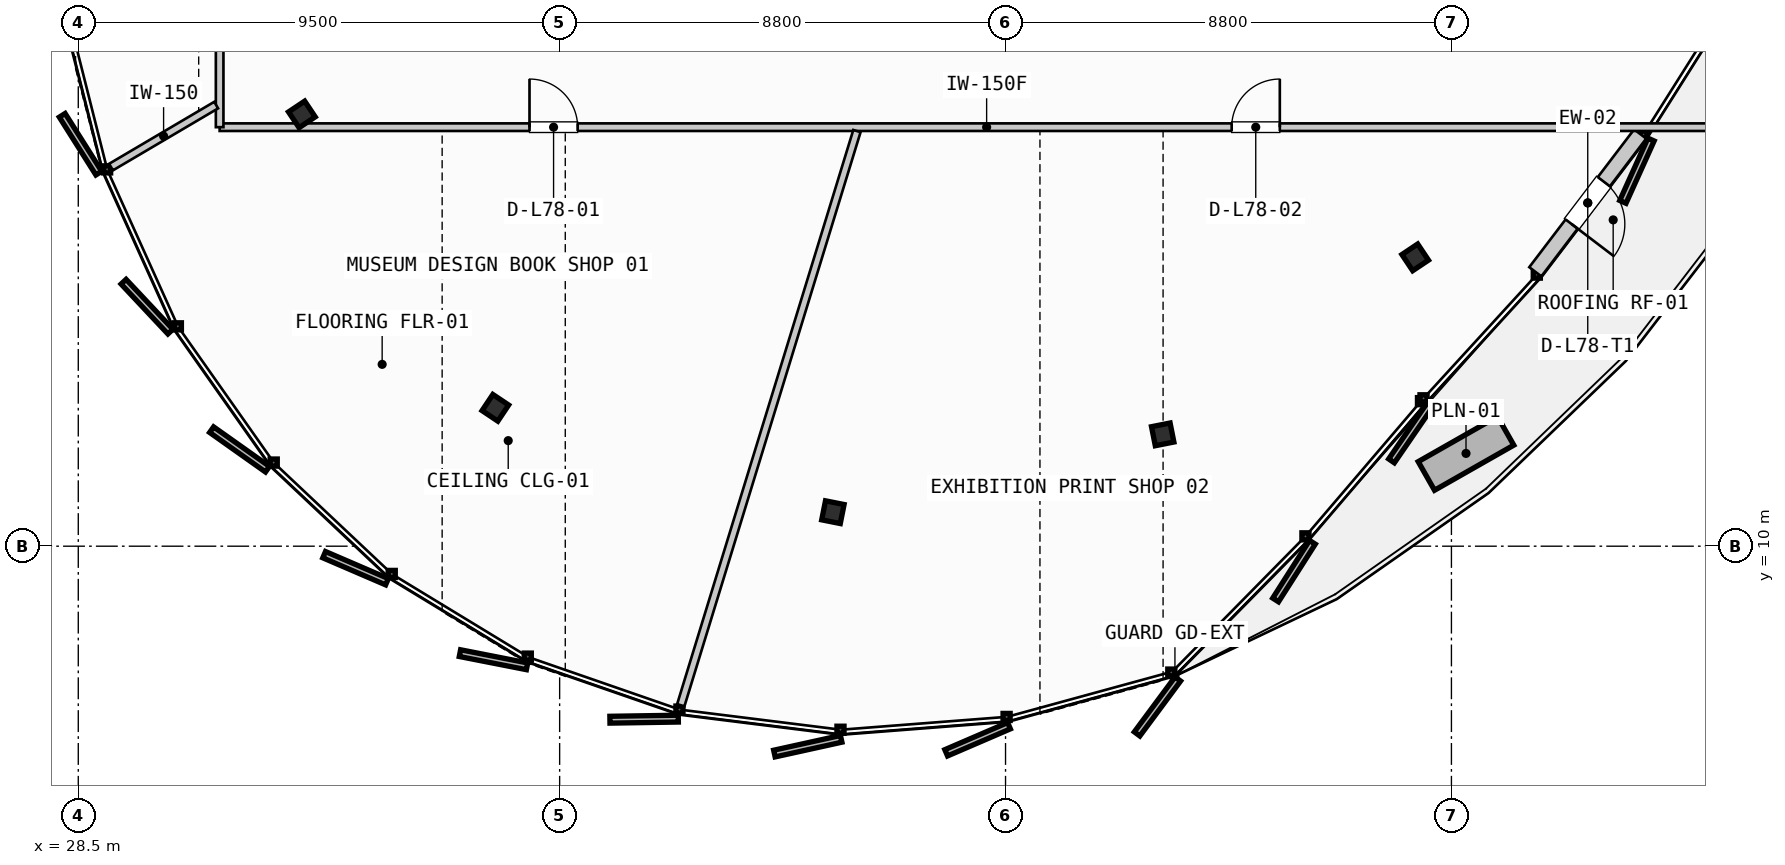
"""IFC4 building model, lengths in metres.
Left out: names, types, materials, properties, quantities, classifications, styles, units other than length and angle.
Written with IfcOpenShell. Run it as: python <this file> out.ifc"""

import sys

from ifc_helpers import new_model, si_unit, direction, frame, frame_2d, origin, origin_2d, place, context, subcontext, project, spatial, rectangle, i_section, extrude, source, transform, mapped, element, fill, save


model = new_model("IFC4")
c1 = context("Model", 3, precision=1e-05, world=origin(), true_north=direction((0.0, 1.0)))
c2 = subcontext(c1, "Body", "Model", "MODEL_VIEW")
j1 = project(units=[si_unit("LENGTHUNIT", "METRE"), si_unit("PLANEANGLEUNIT", "RADIAN")], contexts=[c1])
p1 = place(None, origin())
s1 = spatial("IfcSite", under=j1, at=p1, CompositionType="ELEMENT")
p2 = place(p1, origin())
s2 = spatial("IfcBuilding", under=s1, at=p2, CompositionType="ELEMENT")
p3 = place(p2, frame((0.0, 0.0, 293.95)))
s3 = spatial("IfcBuildingStorey", under=s2, at=p3, CompositionType="ELEMENT", Elevation=293.95)
m1 = source(origin(), c2, "Body", "SweptSolid", [
    extrude(i_section(OverallWidth=0.374, OverallDepth=0.383, WebThickness=0.017, FlangeThickness=0.026, FilletRadius=0.015, at=origin_2d()), origin(), (0.0, 0.0, 1.0), 3.21),
])
for number, where, z_axis, x_axis in (
    (1, (32.913, 18.521, 0.0), (0.0, 0.0, 1.0), (-0.831, -0.556, 0.0)),
    (2, (36.731, 12.731, 0.0), (0.0, 0.0, 1.0), (-0.556, -0.831, 0.0)),
    (3, (43.393, 10.671, 0.0), (0.0, 0.0, 1.0), (-0.195, -0.981, 0.0)),
    (4, (49.902, 12.207, 0.0), (0.0, 0.0, 1.0), (0.195, -0.981, 0.0)),
    (5, (54.885, 15.7, 0.0), (0.0, 0.0, 1.0), (0.556, -0.831, 0.0)),
):
    element("IfcColumn", number, at=place(p3, frame(where, z_axis=z_axis, x_axis=x_axis)), inside=s3, PredefinedType="COLUMN", context=c2, shape_type="MappedRepresentation", body=[
        mapped(m1, transform((0.0, 0.0, 0.0), scale=1.0)),
    ])
p4 = place(p3, frame((59.325, 18.135, 0.0), z_axis=(0.0, 0.0, 1.0), x_axis=(-0.605586755282, -0.795779292158, 0.0)))
e6 = element("IfcWall", 6, at=p4, inside=s3, PredefinedType="SOLIDWALL", context=c2, shape_type="SweptSolid", body=[
    extrude(rectangle(XDim=3.417, YDim=0.3, at=frame_2d((1.708, 0.0))), origin(), (0.0, 0.0, 1.0), 2.735),
])
p5 = place(p4, frame((1.184, 0.0, 0.0)))
e7 = element("IfcOpeningElement", 7, at=p5, cuts=e6, PredefinedType="OPENING", context=c2, shape_type="SweptSolid", body=[
    extrude(rectangle(XDim=1.05, YDim=2.2, at=frame_2d((0.525, 1.1))), frame((0.0, 0.16, 0.0), z_axis=(0.0, -1.0, 0.0), x_axis=(1.0, 0.0, 0.0)), (0.0, 0.0, 1.0), 0.32),
])
p6 = place(p3, frame((31.29, 18.269, 0.0), z_axis=(0.0, 0.0, 1.0), x_axis=(1.0, 0.0, 0.0)))
e8 = element("IfcWall", 8, at=p6, inside=s3, PredefinedType="PARTITIONING", context=c2, shape_type="SweptSolid", body=[
    extrude(rectangle(XDim=30.274, YDim=0.15, at=frame_2d((15.137, 0.0))), origin(), (0.0, 0.0, 1.0), 2.315),
])
p7 = place(p6, frame((6.115, 0.0, 0.0)))
e9 = element("IfcOpeningElement", 9, at=p7, cuts=e8, PredefinedType="OPENING", context=c2, shape_type="SweptSolid", body=[
    extrude(rectangle(XDim=0.95, YDim=2.15, at=frame_2d((0.475, 1.075))), frame((0.0, 0.085, 0.0), z_axis=(0.0, -1.0, 0.0), x_axis=(1.0, 0.0, 0.0)), (0.0, 0.0, 1.0), 0.17),
])
p8 = place(p6, frame((19.973, 0.0, 0.0)))
e10 = element("IfcOpeningElement", 10, at=p8, cuts=e8, PredefinedType="OPENING", context=c2, shape_type="SweptSolid", body=[
    extrude(rectangle(XDim=0.95, YDim=2.15, at=frame_2d((0.475, 1.075))), frame((0.0, 0.085, 0.0), z_axis=(0.0, -1.0, 0.0), x_axis=(1.0, 0.0, 0.0)), (0.0, 0.0, 1.0), 0.17),
])
p9 = place(p3, frame((31.29, 37.562, 0.0), z_axis=(0.0, 0.0, 1.0), x_axis=(0.0, -1.0, 0.0)))
e11 = element("IfcWall", 11, at=p9, inside=s3, PredefinedType="PARTITIONING", context=c2, shape_type="SweptSolid", body=[
    extrude(rectangle(XDim=19.293, YDim=0.15, at=frame_2d((9.646, 0.0))), origin(), (0.0, 0.0, 1.0), 2.315),
])
p10 = place(p9, frame((4.525, 0.0, 0.0)))
e12 = element("IfcOpeningElement", 12, at=p10, cuts=e11, PredefinedType="OPENING", context=c2, shape_type="SweptSolid", body=[
    extrude(rectangle(XDim=0.95, YDim=2.15, at=frame_2d((0.475, 1.075))), frame((0.0, 0.085, 0.0), z_axis=(0.0, -1.0, 0.0), x_axis=(1.0, 0.0, 0.0)), (0.0, 0.0, 1.0), 0.17),
])
p11 = place(p9, frame((13.992, 0.0, 0.0)))
e13 = element("IfcOpeningElement", 13, at=p11, cuts=e11, PredefinedType="OPENING", context=c2, shape_type="SweptSolid", body=[
    extrude(rectangle(XDim=0.95, YDim=2.15, at=frame_2d((0.475, 1.075))), frame((0.0, 0.085, 0.0), z_axis=(0.0, -1.0, 0.0), x_axis=(1.0, 0.0, 0.0)), (0.0, 0.0, 1.0), 0.17),
])
p12 = place(p3, frame((31.221, 18.704, 0.0), z_axis=(0.0, 0.0, 1.0), x_axis=(-0.861571718846, -0.507635866823, 0.0)))
e14 = element("IfcWall", 14, at=p12, inside=s3, PredefinedType="PARTITIONING", context=c2, shape_type="SweptSolid", body=[
    extrude(rectangle(XDim=2.408, YDim=0.15, at=frame_2d((1.204, 0.0))), origin(), (0.0, 0.0, 1.0), 2.315),
])
p13 = place(p3, frame((43.867, 18.192, 0.0), z_axis=(0.0, 0.0, 1.0), x_axis=(-0.293314223646, -0.956016090977, 0.0)))
e15 = element("IfcWall", 15, at=p13, inside=s3, PredefinedType="PARTITIONING", context=c2, shape_type="SweptSolid", body=[
    extrude(rectangle(XDim=11.852, YDim=0.15, at=frame_2d((5.926, 0.0))), origin(), (0.0, 0.0, 1.0), 2.315),
])
m2 = source(origin(), c2, "Body", "SweptSolid", [
    extrude(rectangle(XDim=1.05, YDim=2.2, at=frame_2d((0.525, 1.1))), frame((0.0, 0.025, 0.0), z_axis=(0.0, -1.0, 0.0), x_axis=(1.0, 0.0, 0.0)), (0.0, 0.0, 1.0), 0.05),
])
p14 = place(p5, origin())
e16 = element("IfcDoor", 16, at=p14, inside=s3, OperationType="SINGLE_SWING_RIGHT", PredefinedType="DOOR", context=c2, shape_type="MappedRepresentation", body=[
    mapped(m2, transform((0.0, 0.0, 0.0), scale=1.0)),
])
fill(e7, e16)
m3 = source(origin(), c2, "Body", "SweptSolid", [
    extrude(rectangle(XDim=0.95, YDim=2.15, at=frame_2d((0.475, 1.075))), frame((0.0, 0.025, 0.0), z_axis=(0.0, -1.0, 0.0), x_axis=(1.0, 0.0, 0.0)), (0.0, 0.0, 1.0), 0.05),
])
p15 = place(p7, origin())
e17 = element("IfcDoor", 17, at=p15, inside=s3, OperationType="SINGLE_SWING_LEFT", PredefinedType="DOOR", context=c2, shape_type="MappedRepresentation", body=[
    mapped(m3, transform((0.0, 0.0, 0.0), scale=1.0)),
])
fill(e9, e17)
p16 = place(p8, origin())
e18 = element("IfcDoor", 18, at=p16, inside=s3, OperationType="SINGLE_SWING_RIGHT", PredefinedType="DOOR", context=c2, shape_type="MappedRepresentation", body=[
    mapped(m3, transform((0.0, 0.0, 0.0), scale=1.0)),
])
fill(e10, e18)
save(model, sys.argv[1])
